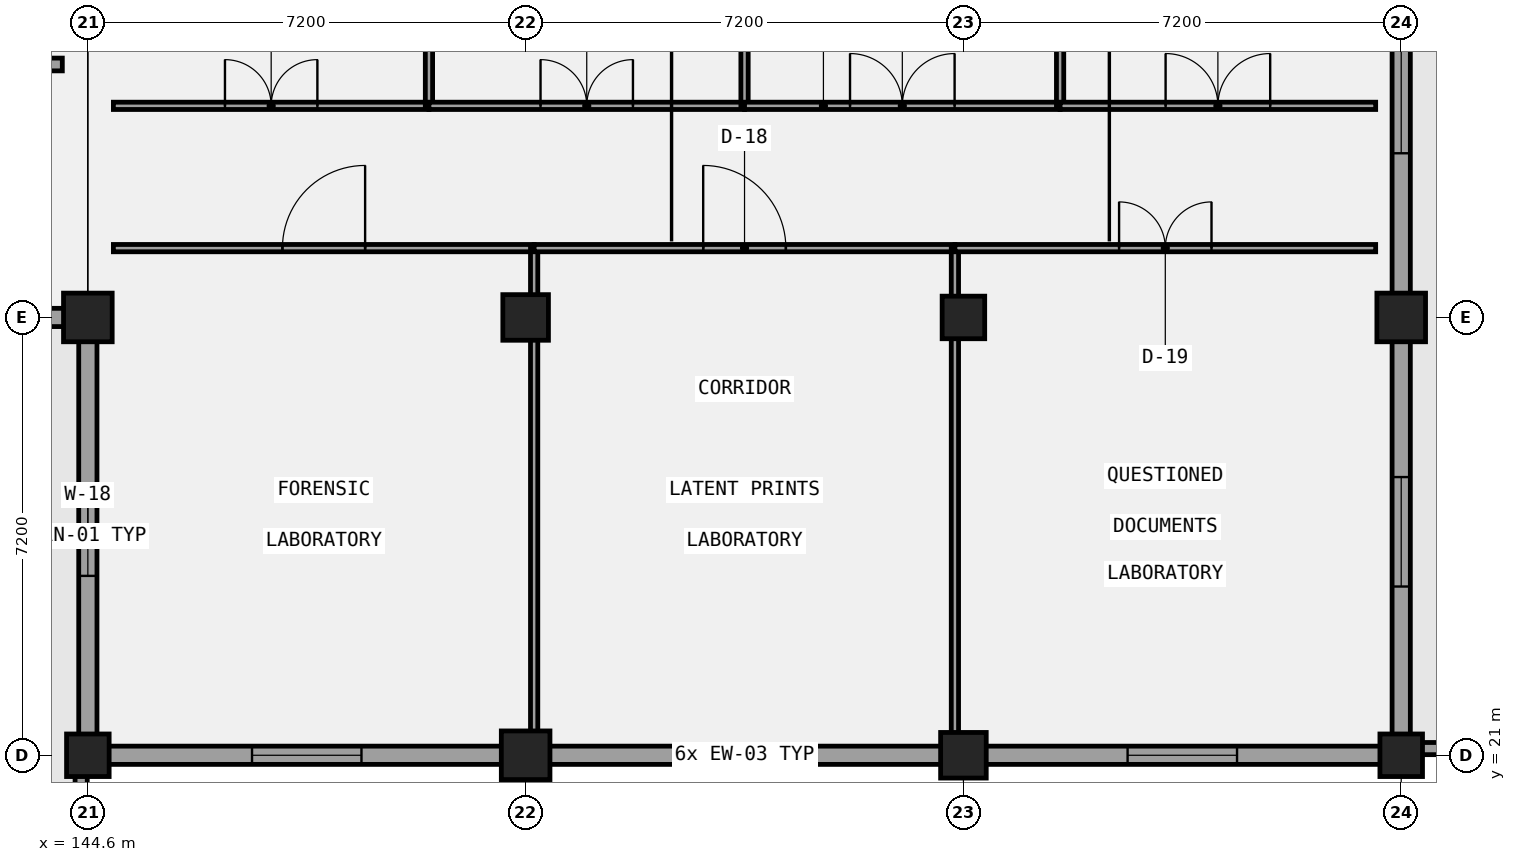
"""IFC4 building model, lengths in metres.
Left out: names, types, materials, properties, quantities, classifications, styles, units other than length and angle.
Written with IfcOpenShell. Run it as: python <this file> out.ifc"""

import sys

from ifc_helpers import new_model, si_unit, direction, frame, frame_2d, origin, origin_2d, place, context, subcontext, project, spatial, rectangle, extrude, element, fill, save


model = new_model("IFC4")
c1 = context("Model", 3, precision=1e-05, world=origin(), true_north=direction((0.0, 1.0)))
c2 = subcontext(c1, "Body", "Model", "MODEL_VIEW")
j1 = project(units=[si_unit("LENGTHUNIT", "METRE"), si_unit("PLANEANGLEUNIT", "RADIAN")], contexts=[c1])
p1 = place(None, origin())
s1 = spatial("IfcSite", under=j1, at=p1, CompositionType="ELEMENT")
p2 = place(p1, origin())
s2 = spatial("IfcBuilding", under=s1, at=p2, CompositionType="ELEMENT")
p3 = place(p2, frame((0.0, 0.0, 5.4)))
s3 = spatial("IfcBuildingStorey", under=s2, at=p3, CompositionType="ELEMENT", Elevation=5.4)
p4 = place(p3, frame((144.6, 21.0, 0.0), z_axis=(0.0, 0.0, 1.0), x_axis=(1.0, 0.0, 0.0)))
e1 = element("IfcColumn", 1, at=p4, inside=s3, PredefinedType="COLUMN", context=c2, shape_type="SweptSolid", body=[
    extrude(rectangle(XDim=0.7, YDim=0.7, at=origin_2d()), origin(), (0.0, 0.0, 1.0), 4.2),
])
for number, where, z_axis, x_axis in (
    (2, (144.6, 28.2, 0.0), (0.0, 0.0, 1.0), (1.0, 0.0, 0.0)),
    (3, (151.8, 21.0, 0.0), (0.0, 0.0, 1.0), (1.0, 0.0, 0.0)),
):
    element("IfcColumn", number, at=place(p3, frame(where, z_axis=z_axis, x_axis=x_axis)), inside=s3, PredefinedType="COLUMN", context=c2, shape_type="SweptSolid", body=[
        extrude(rectangle(XDim=0.8, YDim=0.8, at=origin_2d()), origin(), (0.0, 0.0, 1.0), 4.2),
    ])
for number, where, z_axis, x_axis in (
    (4, (151.8, 28.2, 0.0), (0.0, 0.0, 1.0), (1.0, 0.0, 0.0)),
    (5, (159.0, 21.0, 0.0), (0.0, 0.0, 1.0), (1.0, 0.0, 0.0)),
):
    element("IfcColumn", number, at=place(p3, frame(where, z_axis=z_axis, x_axis=x_axis)), inside=s3, PredefinedType="COLUMN", context=c2, shape_type="SweptSolid", body=[
        extrude(rectangle(XDim=0.75, YDim=0.75, at=origin_2d()), origin(), (0.0, 0.0, 1.0), 4.2),
    ])
for number, where, z_axis, x_axis in (
    (6, (159.0, 28.2, 0.0), (0.0, 0.0, 1.0), (1.0, 0.0, 0.0)),
    (7, (166.2, 21.0, 0.0), (0.0, 0.0, 1.0), (1.0, 0.0, 0.0)),
):
    element("IfcColumn", number, at=place(p3, frame(where, z_axis=z_axis, x_axis=x_axis)), inside=s3, PredefinedType="COLUMN", context=c2, shape_type="SweptSolid", body=[
        extrude(rectangle(XDim=0.7, YDim=0.7, at=origin_2d()), origin(), (0.0, 0.0, 1.0), 4.2),
    ])
p5 = place(p3, frame((166.2, 28.2, 0.0), z_axis=(0.0, 0.0, 1.0), x_axis=(1.0, 0.0, 0.0)))
e8 = element("IfcColumn", 8, at=p5, inside=s3, PredefinedType="COLUMN", context=c2, shape_type="SweptSolid", body=[
    extrude(rectangle(XDim=0.8, YDim=0.8, at=origin_2d()), origin(), (0.0, 0.0, 1.0), 4.2),
])
p6 = place(p3, frame((137.25, 28.2, 0.0), z_axis=(0.0, 0.0, 1.0), x_axis=(1.0, 0.0, 0.0)))
e9 = element("IfcWall", 9, at=p6, inside=s3, PredefinedType="SOLIDWALL", context=c2, shape_type="SweptSolid", body=[
    extrude(rectangle(XDim=7.5, YDim=0.3, at=frame_2d((3.75, 0.0))), origin(), (0.0, 0.0, 1.0), 2.92),
])
p7 = place(p6, frame((2.95, 0.0, 1.0)))
e10 = element("IfcOpeningElement", 10, at=p7, cuts=e9, PredefinedType="OPENING", context=c2, shape_type="SweptSolid", body=[
    extrude(rectangle(XDim=1.6, YDim=1.4, at=frame_2d((0.8, 0.7))), frame((0.0, 0.16, 0.0), z_axis=(0.0, -1.0, 0.0), x_axis=(1.0, 0.0, 0.0)), (0.0, 0.0, 1.0), 0.32),
])
p8 = place(p3, frame((144.6, 28.05, 0.0), z_axis=(0.0, 0.0, 1.0), x_axis=(0.0, -1.0, 0.0)))
e11 = element("IfcWall", 11, at=p8, inside=s3, PredefinedType="SOLIDWALL", context=c2, shape_type="SweptSolid", body=[
    extrude(rectangle(XDim=6.9, YDim=0.3, at=frame_2d((3.45, 0.0))), origin(), (0.0, 0.0, 1.0), 3.27),
])
p9 = place(p8, frame((2.8, 0.0, 1.0)))
e12 = element("IfcOpeningElement", 12, at=p9, cuts=e11, PredefinedType="OPENING", context=c2, shape_type="SweptSolid", body=[
    extrude(rectangle(XDim=1.3, YDim=1.9, at=frame_2d((0.65, 0.95))), frame((0.0, 0.16, 0.0), z_axis=(0.0, -1.0, 0.0), x_axis=(1.0, 0.0, 0.0)), (0.0, 0.0, 1.0), 0.32),
])
p10 = place(p3, frame((144.45, 21.0, 0.0), z_axis=(0.0, 0.0, 1.0), x_axis=(1.0, 0.0, 0.0)))
e13 = element("IfcWall", 13, at=p10, inside=s3, PredefinedType="SOLIDWALL", context=c2, shape_type="SweptSolid", body=[
    extrude(rectangle(XDim=21.9, YDim=0.3, at=frame_2d((10.95, 0.0))), origin(), (0.0, 0.0, 1.0), 2.92),
])
p11 = place(p10, frame((2.85, 0.0, 1.0)))
e14 = element("IfcOpeningElement", 14, at=p11, cuts=e13, PredefinedType="OPENING", context=c2, shape_type="SweptSolid", body=[
    extrude(rectangle(XDim=1.8, YDim=1.4, at=frame_2d((0.9, 0.7))), frame((0.0, 0.16, 0.0), z_axis=(0.0, -1.0, 0.0), x_axis=(1.0, 0.0, 0.0)), (0.0, 0.0, 1.0), 0.32),
])
p12 = place(p10, frame((10.05, 0.0, 1.0)))
e15 = element("IfcOpeningElement", 15, at=p12, cuts=e13, PredefinedType="OPENING", context=c2, shape_type="SweptSolid", body=[
    extrude(rectangle(XDim=1.8, YDim=1.4, at=frame_2d((0.9, 0.7))), frame((0.0, 0.16, 0.0), z_axis=(0.0, -1.0, 0.0), x_axis=(1.0, 0.0, 0.0)), (0.0, 0.0, 1.0), 0.32),
])
p13 = place(p10, frame((17.25, 0.0, 1.0)))
e16 = element("IfcOpeningElement", 16, at=p13, cuts=e13, PredefinedType="OPENING", context=c2, shape_type="SweptSolid", body=[
    extrude(rectangle(XDim=1.8, YDim=1.4, at=frame_2d((0.9, 0.7))), frame((0.0, 0.16, 0.0), z_axis=(0.0, -1.0, 0.0), x_axis=(1.0, 0.0, 0.0)), (0.0, 0.0, 1.0), 0.32),
])
p14 = place(p3, frame((166.2, 21.15, 0.0), z_axis=(0.0, 0.0, 1.0), x_axis=(0.0, 1.0, 0.0)))
e17 = element("IfcWall", 17, at=p14, inside=s3, PredefinedType="SOLIDWALL", context=c2, shape_type="SweptSolid", body=[
    extrude(rectangle(XDim=21.2, YDim=0.3, at=frame_2d((10.6, 0.0))), origin(), (0.0, 0.0, 1.0), 3.02),
])
p15 = place(p14, frame((2.625, 0.0, 1.0)))
e18 = element("IfcOpeningElement", 18, at=p15, cuts=e17, PredefinedType="OPENING", context=c2, shape_type="SweptSolid", body=[
    extrude(rectangle(XDim=1.8, YDim=1.65, at=frame_2d((0.9, 0.825))), frame((0.0, 0.16, 0.0), z_axis=(0.0, -1.0, 0.0), x_axis=(1.0, 0.0, 0.0)), (0.0, 0.0, 1.0), 0.32),
])
p16 = place(p14, frame((9.75, 0.0, 1.0)))
e19 = element("IfcOpeningElement", 19, at=p16, cuts=e17, PredefinedType="OPENING", context=c2, shape_type="SweptSolid", body=[
    extrude(rectangle(XDim=1.8, YDim=1.65, at=frame_2d((0.9, 0.825))), frame((0.0, 0.16, 0.0), z_axis=(0.0, -1.0, 0.0), x_axis=(1.0, 0.0, 0.0)), (0.0, 0.0, 1.0), 0.32),
])
p17 = place(p14, frame((16.825, 0.0, 1.0)))
e20 = element("IfcOpeningElement", 20, at=p17, cuts=e17, PredefinedType="OPENING", context=c2, shape_type="SweptSolid", body=[
    extrude(rectangle(XDim=1.8, YDim=1.65, at=frame_2d((0.9, 0.825))), frame((0.0, 0.16, 0.0), z_axis=(0.0, -1.0, 0.0), x_axis=(1.0, 0.0, 0.0)), (0.0, 0.0, 1.0), 0.32),
])
p18 = place(p3, frame((173.89, 21.11, 0.0), z_axis=(0.0, 0.0, 1.0), x_axis=(-1.0, 0.0, 0.0)))
e21 = element("IfcWall", 21, at=p18, inside=s3, PredefinedType="PARAPET", context=c2, shape_type="SweptSolid", body=[
    extrude(rectangle(XDim=7.47, YDim=0.2, at=frame_2d((3.735, 0.0))), origin(), (0.0, 0.0, 1.0), 1.12),
])
p19 = place(p3, frame((144.49, 20.7, 0.0), z_axis=(0.0, 0.0, 1.0), x_axis=(0.0, -1.0, 0.0)))
e22 = element("IfcWall", 22, at=p19, inside=s3, PredefinedType="PARAPET", context=c2, shape_type="SweptSolid", body=[
    extrude(rectangle(XDim=20.48, YDim=0.2, at=frame_2d((10.24, 0.0))), origin(), (0.0, 0.0, 1.0), 1.12),
])
p20 = place(p3, frame((134.314, 32.36, 0.0), z_axis=(0.0, 0.0, 1.0), x_axis=(1.0, 0.0, 0.0)))
e23 = element("IfcWall", 23, at=p20, inside=s3, PredefinedType="PARTITIONING", context=c2, shape_type="SweptSolid", body=[
    extrude(rectangle(XDim=9.866, YDim=0.21, at=frame_2d((4.933, 0.0))), origin(), (0.0, 0.0, 1.0), 3.92),
])
p21 = place(p20, frame((4.443, 0.0, 0.0)))
e24 = element("IfcOpeningElement", 24, at=p21, cuts=e23, PredefinedType="OPENING", context=c2, shape_type="SweptSolid", body=[
    extrude(rectangle(XDim=0.98, YDim=2.35, at=frame_2d((0.49, 1.175))), frame((0.0, 0.115, 0.0), z_axis=(0.0, -1.0, 0.0), x_axis=(1.0, 0.0, 0.0)), (0.0, 0.0, 1.0), 0.23),
])
p22 = place(p3, frame((145.02, 29.34, 0.0), z_axis=(0.0, 0.0, 1.0), x_axis=(1.0, 0.0, 0.0)))
e25 = element("IfcWall", 25, at=p22, inside=s3, PredefinedType="PARTITIONING", context=c2, shape_type="SweptSolid", body=[
    extrude(rectangle(XDim=6.92, YDim=0.12, at=frame_2d((3.46, 0.0))), origin(), (0.0, 0.0, 1.0), 3.92),
])
p23 = place(p22, frame((2.78, 0.0, 0.0)))
e26 = element("IfcOpeningElement", 26, at=p23, cuts=e25, PredefinedType="OPENING", context=c2, shape_type="SweptSolid", body=[
    extrude(rectangle(XDim=1.36, YDim=2.22, at=frame_2d((0.68, 1.11))), frame((0.0, 0.07, 0.0), z_axis=(0.0, -1.0, 0.0), x_axis=(1.0, 0.0, 0.0)), (0.0, 0.0, 1.0), 0.14),
])
p24 = place(p3, frame((151.94, 21.18, 0.0), z_axis=(0.0, 0.0, 1.0), x_axis=(0.0, 1.0, 0.0)))
e27 = element("IfcWall", 27, at=p24, inside=s3, PredefinedType="PARTITIONING", context=c2, shape_type="SweptSolid", body=[
    extrude(rectangle(XDim=8.16, YDim=0.12, at=frame_2d((4.08, 0.0))), origin(), (0.0, 0.0, 1.0), 3.17),
])
p25 = place(p3, frame((151.94, 29.34, 0.0), z_axis=(0.0, 0.0, 1.0), x_axis=(1.0, 0.0, 0.0)))
e28 = element("IfcWall", 28, at=p25, inside=s3, PredefinedType="PARTITIONING", context=c2, shape_type="SweptSolid", body=[
    extrude(rectangle(XDim=6.92, YDim=0.12, at=frame_2d((3.46, 0.0))), origin(), (0.0, 0.0, 1.0), 3.92),
])
p26 = place(p25, frame((2.78, 0.0, 0.0)))
e29 = element("IfcOpeningElement", 29, at=p26, cuts=e28, PredefinedType="OPENING", context=c2, shape_type="SweptSolid", body=[
    extrude(rectangle(XDim=1.36, YDim=2.35, at=frame_2d((0.68, 1.175))), frame((0.0, 0.07, 0.0), z_axis=(0.0, -1.0, 0.0), x_axis=(1.0, 0.0, 0.0)), (0.0, 0.0, 1.0), 0.14),
])
p27 = place(p3, frame((158.86, 21.18, 0.0), z_axis=(0.0, 0.0, 1.0), x_axis=(0.0, 1.0, 0.0)))
e30 = element("IfcWall", 30, at=p27, inside=s3, PredefinedType="PARTITIONING", context=c2, shape_type="SweptSolid", body=[
    extrude(rectangle(XDim=8.16, YDim=0.12, at=frame_2d((4.08, 0.0))), origin(), (0.0, 0.0, 1.0), 3.12),
])
p28 = place(p3, frame((158.86, 29.34, 0.0), z_axis=(0.0, 0.0, 1.0), x_axis=(1.0, 0.0, 0.0)))
e31 = element("IfcWall", 31, at=p28, inside=s3, PredefinedType="PARTITIONING", context=c2, shape_type="SweptSolid", body=[
    extrude(rectangle(XDim=6.92, YDim=0.12, at=frame_2d((3.46, 0.0))), origin(), (0.0, 0.0, 1.0), 3.92),
])
p29 = place(p28, frame((2.7, 0.0, 0.0)))
e32 = element("IfcOpeningElement", 32, at=p29, cuts=e31, PredefinedType="OPENING", context=c2, shape_type="SweptSolid", body=[
    extrude(rectangle(XDim=1.52, YDim=2.1, at=frame_2d((0.76, 1.05))), frame((0.0, 0.07, 0.0), z_axis=(0.0, -1.0, 0.0), x_axis=(1.0, 0.0, 0.0)), (0.0, 0.0, 1.0), 0.14),
])
p30 = place(p3, frame((145.02, 31.68, 0.0), z_axis=(0.0, 0.0, 1.0), x_axis=(1.0, 0.0, 0.0)))
e33 = element("IfcWall", 33, at=p30, inside=s3, PredefinedType="PARTITIONING", context=c2, shape_type="SweptSolid", body=[
    extrude(rectangle(XDim=5.19, YDim=0.12, at=frame_2d((2.595, 0.0))), origin(), (0.0, 0.0, 1.0), 3.37),
])
p31 = place(p30, frame((1.835, 0.0, 0.0)))
e34 = element("IfcOpeningElement", 34, at=p31, cuts=e33, PredefinedType="OPENING", context=c2, shape_type="SweptSolid", body=[
    extrude(rectangle(XDim=1.52, YDim=2.22, at=frame_2d((0.76, 1.11))), frame((0.0, 0.07, 0.0), z_axis=(0.0, -1.0, 0.0), x_axis=(1.0, 0.0, 0.0)), (0.0, 0.0, 1.0), 0.14),
])
p32 = place(p3, frame((150.21, 31.68, 0.0), z_axis=(0.0, 0.0, 1.0), x_axis=(0.0, 1.0, 0.0)))
e35 = element("IfcWall", 35, at=p32, inside=s3, PredefinedType="PARTITIONING", context=c2, shape_type="SweptSolid", body=[
    extrude(rectangle(XDim=7.92, YDim=0.12, at=frame_2d((3.96, 0.0))), origin(), (0.0, 0.0, 1.0), 3.92),
])
p33 = place(p3, frame((150.21, 31.68, 0.0), z_axis=(0.0, 0.0, 1.0), x_axis=(1.0, 0.0, 0.0)))
e36 = element("IfcWall", 36, at=p33, inside=s3, PredefinedType="PARTITIONING", context=c2, shape_type="SweptSolid", body=[
    extrude(rectangle(XDim=5.19, YDim=0.12, at=frame_2d((2.595, 0.0))), origin(), (0.0, 0.0, 1.0), 3.37),
])
p34 = place(p33, frame((1.835, 0.0, 0.0)))
e37 = element("IfcOpeningElement", 37, at=p34, cuts=e36, PredefinedType="OPENING", context=c2, shape_type="SweptSolid", body=[
    extrude(rectangle(XDim=1.52, YDim=2.35, at=frame_2d((0.76, 1.175))), frame((0.0, 0.07, 0.0), z_axis=(0.0, -1.0, 0.0), x_axis=(1.0, 0.0, 0.0)), (0.0, 0.0, 1.0), 0.14),
])
p35 = place(p3, frame((155.4, 31.68, 0.0), z_axis=(0.0, 0.0, 1.0), x_axis=(0.0, 1.0, 0.0)))
e38 = element("IfcWall", 38, at=p35, inside=s3, PredefinedType="PARTITIONING", context=c2, shape_type="SweptSolid", body=[
    extrude(rectangle(XDim=7.92, YDim=0.12, at=frame_2d((3.96, 0.0))), origin(), (0.0, 0.0, 1.0), 3.92),
])
p36 = place(p3, frame((155.4, 31.68, 0.0), z_axis=(0.0, 0.0, 1.0), x_axis=(1.0, 0.0, 0.0)))
e39 = element("IfcWall", 39, at=p36, inside=s3, PredefinedType="PARTITIONING", context=c2, shape_type="SweptSolid", body=[
    extrude(rectangle(XDim=5.19, YDim=0.12, at=frame_2d((2.595, 0.0))), origin(), (0.0, 0.0, 1.0), 3.37),
])
p37 = place(p36, frame((1.735, 0.0, 0.0)))
e40 = element("IfcOpeningElement", 40, at=p37, cuts=e39, PredefinedType="OPENING", context=c2, shape_type="SweptSolid", body=[
    extrude(rectangle(XDim=1.72, YDim=2.1, at=frame_2d((0.86, 1.05))), frame((0.0, 0.07, 0.0), z_axis=(0.0, -1.0, 0.0), x_axis=(1.0, 0.0, 0.0)), (0.0, 0.0, 1.0), 0.14),
])
p38 = place(p3, frame((160.59, 31.68, 0.0), z_axis=(0.0, 0.0, 1.0), x_axis=(0.0, 1.0, 0.0)))
e41 = element("IfcWall", 41, at=p38, inside=s3, PredefinedType="PARTITIONING", context=c2, shape_type="SweptSolid", body=[
    extrude(rectangle(XDim=7.92, YDim=0.12, at=frame_2d((3.96, 0.0))), origin(), (0.0, 0.0, 1.0), 3.92),
])
p39 = place(p3, frame((160.59, 31.68, 0.0), z_axis=(0.0, 0.0, 1.0), x_axis=(1.0, 0.0, 0.0)))
e42 = element("IfcWall", 42, at=p39, inside=s3, PredefinedType="PARTITIONING", context=c2, shape_type="SweptSolid", body=[
    extrude(rectangle(XDim=5.19, YDim=0.12, at=frame_2d((2.595, 0.0))), origin(), (0.0, 0.0, 1.0), 3.37),
])
p40 = place(p39, frame((1.735, 0.0, 0.0)))
e43 = element("IfcOpeningElement", 43, at=p40, cuts=e42, PredefinedType="OPENING", context=c2, shape_type="SweptSolid", body=[
    extrude(rectangle(XDim=1.72, YDim=2.22, at=frame_2d((0.86, 1.11))), frame((0.0, 0.07, 0.0), z_axis=(0.0, -1.0, 0.0), x_axis=(1.0, 0.0, 0.0)), (0.0, 0.0, 1.0), 0.14),
])
p41 = place(p9, origin())
e44 = element("IfcWindow", 44, at=p41, inside=s3, PartitioningType="SINGLE_PANEL", PredefinedType="WINDOW", context=c2, shape_type="SweptSolid", body=[
    extrude(rectangle(XDim=1.3, YDim=1.9, at=frame_2d((0.65, 0.95))), frame((0.0, 0.03, 0.0), z_axis=(0.0, -1.0, 0.0), x_axis=(1.0, 0.0, 0.0)), (0.0, 0.0, 1.0), 0.06),
])
fill(e12, e44)
p42 = place(p11, origin())
e45 = element("IfcWindow", 45, at=p42, inside=s3, PartitioningType="SINGLE_PANEL", PredefinedType="WINDOW", context=c2, shape_type="SweptSolid", body=[
    extrude(rectangle(XDim=1.8, YDim=1.4, at=frame_2d((0.9, 0.7))), frame((0.0, 0.03, 0.0), z_axis=(0.0, -1.0, 0.0), x_axis=(1.0, 0.0, 0.0)), (0.0, 0.0, 1.0), 0.06),
])
fill(e14, e45)
p43 = place(p12, origin())
e46 = element("IfcWindow", 46, at=p43, inside=s3, PartitioningType="SINGLE_PANEL", PredefinedType="WINDOW", context=c2, shape_type="SweptSolid", body=[
    extrude(rectangle(XDim=1.8, YDim=1.4, at=frame_2d((0.9, 0.7))), frame((0.0, 0.03, 0.0), z_axis=(0.0, -1.0, 0.0), x_axis=(1.0, 0.0, 0.0)), (0.0, 0.0, 1.0), 0.06),
])
fill(e15, e46)
p44 = place(p13, origin())
e47 = element("IfcWindow", 47, at=p44, inside=s3, PartitioningType="SINGLE_PANEL", PredefinedType="WINDOW", context=c2, shape_type="SweptSolid", body=[
    extrude(rectangle(XDim=1.8, YDim=1.4, at=frame_2d((0.9, 0.7))), frame((0.0, 0.03, 0.0), z_axis=(0.0, -1.0, 0.0), x_axis=(1.0, 0.0, 0.0)), (0.0, 0.0, 1.0), 0.06),
])
fill(e16, e47)
p45 = place(p15, origin())
e48 = element("IfcWindow", 48, at=p45, inside=s3, PartitioningType="SINGLE_PANEL", PredefinedType="WINDOW", context=c2, shape_type="SweptSolid", body=[
    extrude(rectangle(XDim=1.8, YDim=1.65, at=frame_2d((0.9, 0.825))), frame((0.0, 0.03, 0.0), z_axis=(0.0, -1.0, 0.0), x_axis=(1.0, 0.0, 0.0)), (0.0, 0.0, 1.0), 0.06),
])
fill(e18, e48)
p46 = place(p16, origin())
e49 = element("IfcWindow", 49, at=p46, inside=s3, PartitioningType="SINGLE_PANEL", PredefinedType="WINDOW", context=c2, shape_type="SweptSolid", body=[
    extrude(rectangle(XDim=1.8, YDim=1.65, at=frame_2d((0.9, 0.825))), frame((0.0, 0.03, 0.0), z_axis=(0.0, -1.0, 0.0), x_axis=(1.0, 0.0, 0.0)), (0.0, 0.0, 1.0), 0.06),
])
fill(e19, e49)
p47 = place(p23, frame((1.36, 0.0, 0.0), z_axis=(0.0, 0.0, 1.0), x_axis=(-1.0, 0.0, 0.0)))
e50 = element("IfcDoor", 50, at=p47, inside=s3, OperationType="SINGLE_SWING_RIGHT", PredefinedType="DOOR", context=c2, shape_type="SweptSolid", body=[
    extrude(rectangle(XDim=1.36, YDim=2.22, at=frame_2d((0.68, 1.11))), frame((0.0, 0.025, 0.0), z_axis=(0.0, -1.0, 0.0), x_axis=(1.0, 0.0, 0.0)), (0.0, 0.0, 1.0), 0.05),
])
fill(e26, e50)
p48 = place(p26, frame((1.36, 0.0, 0.0), z_axis=(0.0, 0.0, 1.0), x_axis=(-1.0, 0.0, 0.0)))
e51 = element("IfcDoor", 51, at=p48, inside=s3, OperationType="SINGLE_SWING_LEFT", PredefinedType="DOOR", context=c2, shape_type="SweptSolid", body=[
    extrude(rectangle(XDim=1.36, YDim=2.35, at=frame_2d((0.68, 1.175))), frame((0.0, 0.025, 0.0), z_axis=(0.0, -1.0, 0.0), x_axis=(1.0, 0.0, 0.0)), (0.0, 0.0, 1.0), 0.05),
])
fill(e29, e51)
p49 = place(p29, frame((1.52, 0.0, 0.0), z_axis=(0.0, 0.0, 1.0), x_axis=(-1.0, 0.0, 0.0)))
e52 = element("IfcDoor", 52, at=p49, inside=s3, OperationType="DOUBLE_DOOR_SINGLE_SWING", PredefinedType="DOOR", context=c2, shape_type="SweptSolid", body=[
    extrude(rectangle(XDim=1.52, YDim=2.1, at=frame_2d((0.76, 1.05))), frame((0.0, 0.025, 0.0), z_axis=(0.0, -1.0, 0.0), x_axis=(1.0, 0.0, 0.0)), (0.0, 0.0, 1.0), 0.05),
])
fill(e32, e52)
p50 = place(p31, origin())
e53 = element("IfcDoor", 53, at=p50, inside=s3, OperationType="DOUBLE_DOOR_SINGLE_SWING", PredefinedType="DOOR", context=c2, shape_type="SweptSolid", body=[
    extrude(rectangle(XDim=1.52, YDim=2.22, at=frame_2d((0.76, 1.11))), frame((0.0, 0.025, 0.0), z_axis=(0.0, -1.0, 0.0), x_axis=(1.0, 0.0, 0.0)), (0.0, 0.0, 1.0), 0.05),
])
fill(e34, e53)
p51 = place(p34, origin())
e54 = element("IfcDoor", 54, at=p51, inside=s3, OperationType="DOUBLE_DOOR_SINGLE_SWING", PredefinedType="DOOR", context=c2, shape_type="SweptSolid", body=[
    extrude(rectangle(XDim=1.52, YDim=2.35, at=frame_2d((0.76, 1.175))), frame((0.0, 0.025, 0.0), z_axis=(0.0, -1.0, 0.0), x_axis=(1.0, 0.0, 0.0)), (0.0, 0.0, 1.0), 0.05),
])
fill(e37, e54)
p52 = place(p37, origin())
e55 = element("IfcDoor", 55, at=p52, inside=s3, OperationType="DOUBLE_DOOR_SINGLE_SWING", PredefinedType="DOOR", context=c2, shape_type="SweptSolid", body=[
    extrude(rectangle(XDim=1.72, YDim=2.1, at=frame_2d((0.86, 1.05))), frame((0.0, 0.025, 0.0), z_axis=(0.0, -1.0, 0.0), x_axis=(1.0, 0.0, 0.0)), (0.0, 0.0, 1.0), 0.05),
])
fill(e40, e55)
p53 = place(p40, origin())
e56 = element("IfcDoor", 56, at=p53, inside=s3, OperationType="DOUBLE_DOOR_SINGLE_SWING", PredefinedType="DOOR", context=c2, shape_type="SweptSolid", body=[
    extrude(rectangle(XDim=1.72, YDim=2.22, at=frame_2d((0.86, 1.11))), frame((0.0, 0.025, 0.0), z_axis=(0.0, -1.0, 0.0), x_axis=(1.0, 0.0, 0.0)), (0.0, 0.0, 1.0), 0.05),
])
fill(e43, e56)
save(model, sys.argv[1])
